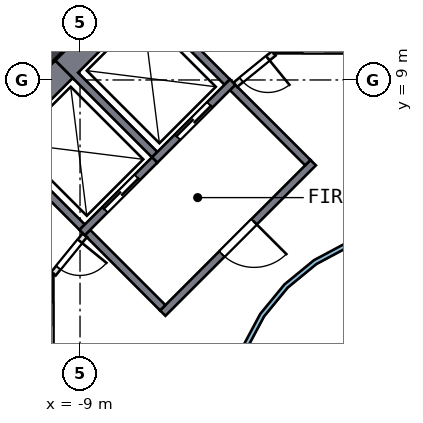
"""IFC4 building model, lengths in metres.
Left out: names, types, materials, properties, quantities, classifications, styles, units other than length and angle.
Written with IfcOpenShell. Run it as: python <this file> out.ifc"""

import sys

from ifc_helpers import new_model, si_unit, direction, frame, frame_2d, origin, place, context, subcontext, project, spatial, polyline, rectangle, outline, extrude, element, fill, save


model = new_model("IFC4")
c1 = context("Model", 3, precision=1e-05, world=origin(), true_north=direction((0.0, 1.0)))
c2 = subcontext(c1, "Body", "Model", "MODEL_VIEW")
j1 = project(units=[si_unit("LENGTHUNIT", "METRE"), si_unit("PLANEANGLEUNIT", "RADIAN")], contexts=[c1])
p1 = place(None, origin())
s1 = spatial("IfcSite", under=j1, at=p1, CompositionType="ELEMENT")
p2 = place(p1, origin())
s2 = spatial("IfcBuilding", under=s1, at=p2, CompositionType="ELEMENT")
p3 = place(p2, frame((0.0, 0.0, 295.0)))
s3 = spatial("IfcBuildingStorey", under=s2, at=p3, CompositionType="ELEMENT", Elevation=295.0)
p4 = place(p3, frame((-5.64, 13.841, 0.0), z_axis=(0.0, 0.0, 1.0), x_axis=(-0.707106781, -0.707106781, 0.0)))
e1 = element("IfcWall", 1, at=p4, inside=s3, PredefinedType="SHEAR", context=c2, shape_type="SweptSolid", body=[
    extrude(rectangle(XDim=11.598, YDim=0.45, at=frame_2d((5.799, 0.0))), origin(), (0.0, 0.0, 1.0), 4.5),
])
p5 = place(p3, frame((-1.2, 9.8, 0.0), z_axis=(0.0, 0.0, 1.0), x_axis=(-1.0, 0.0, 0.0)))
e2 = element("IfcWall", 2, at=p5, inside=s3, PredefinedType="SOLIDWALL", context=c2, shape_type="SweptSolid", body=[
    extrude(rectangle(XDim=2.7, YDim=0.2, at=frame_2d((1.35, 0.0))), origin(), (0.0, 0.0, 1.0), 4.19),
])
p6 = place(p5, frame((0.75, 0.0, 0.0)))
e3 = element("IfcOpeningElement", 3, at=p6, cuts=e2, PredefinedType="OPENING", context=c2, shape_type="SweptSolid", body=[
    extrude(rectangle(XDim=1.2, YDim=2.1, at=frame_2d((0.6, 1.05))), frame((0.0, 0.11, 0.0), z_axis=(0.0, -1.0, 0.0), x_axis=(1.0, 0.0, 0.0)), (0.0, 0.0, 1.0), 0.22),
])
p7 = place(p3, frame((-9.8, 1.2, 0.0), z_axis=(0.0, 0.0, 1.0), x_axis=(0.0, 1.0, 0.0)))
e4 = element("IfcWall", 4, at=p7, inside=s3, PredefinedType="SOLIDWALL", context=c2, shape_type="SweptSolid", body=[
    extrude(rectangle(XDim=2.7, YDim=0.2, at=frame_2d((1.35, 0.0))), origin(), (0.0, 0.0, 1.0), 4.19),
])
p8 = place(p7, frame((0.75, 0.0, 0.0)))
e5 = element("IfcOpeningElement", 5, at=p8, cuts=e4, PredefinedType="OPENING", context=c2, shape_type="SweptSolid", body=[
    extrude(rectangle(XDim=1.2, YDim=2.1, at=frame_2d((0.6, 1.05))), frame((0.0, 0.11, 0.0), z_axis=(0.0, -1.0, 0.0), x_axis=(1.0, 0.0, 0.0)), (0.0, 0.0, 1.0), 0.22),
])
p9 = place(p3, origin())
e6 = element("IfcWall", 6, at=p9, inside=s3, PredefinedType="SOLIDWALL", context=c2, shape_type="SweptSolid", body=[
    extrude(outline(polyline([(-9.652, 9.51), (-7.601, 11.561), (-5.056, 9.016), (-5.197, 8.874), (-7.283, 10.96), (-9.051, 9.192), (-6.965, 7.106), (-7.106, 6.965), (-9.652, 9.51)])), origin(), (0.0, 0.0, 1.0), 4.19),
])
p10 = place(p3, frame((-4.985, 8.945, 0.0), z_axis=(0.0, 0.0, 1.0), x_axis=(-0.707106781, -0.707106781, 0.0)))
e7 = element("IfcWall", 7, at=p10, inside=s3, PredefinedType="SOLIDWALL", context=c2, shape_type="SweptSolid", body=[
    extrude(rectangle(XDim=2.9, YDim=0.2, at=frame_2d((1.45, 0.0))), origin(), (0.0, 0.0, 1.0), 4.19),
])
p11 = place(p10, frame((0.85, 0.0, 0.0)))
e8 = element("IfcOpeningElement", 8, at=p11, cuts=e7, PredefinedType="OPENING", context=c2, shape_type="SweptSolid", body=[
    extrude(rectangle(XDim=1.2, YDim=2.1, at=frame_2d((0.6, 1.05))), frame((0.0, 0.11, 0.0), z_axis=(0.0, -1.0, 0.0), x_axis=(1.0, 0.0, 0.0)), (0.0, 0.0, 1.0), 0.22),
])
p12 = place(p3, origin())
e9 = element("IfcWall", 9, at=p12, inside=s3, PredefinedType="SOLIDWALL", context=c2, shape_type="SweptSolid", body=[
    extrude(outline(polyline([(-11.561, 7.601), (-9.652, 9.51), (-9.192, 9.051), (-10.96, 7.283), (-8.874, 5.197), (-9.016, 5.056), (-11.561, 7.601)])), origin(), (0.0, 0.0, 1.0), 4.19),
])
p13 = place(p3, frame((-7.036, 6.894, 0.0), z_axis=(0.0, 0.0, 1.0), x_axis=(-0.707106781, -0.707106781, 0.0)))
e10 = element("IfcWall", 10, at=p13, inside=s3, PredefinedType="SOLIDWALL", context=c2, shape_type="SweptSolid", body=[
    extrude(rectangle(XDim=2.7, YDim=0.2, at=frame_2d((1.35, 0.0))), origin(), (0.0, 0.0, 1.0), 4.19),
])
p14 = place(p13, frame((0.65, 0.0, 0.0)))
e11 = element("IfcOpeningElement", 11, at=p14, cuts=e10, PredefinedType="OPENING", context=c2, shape_type="SweptSolid", body=[
    extrude(rectangle(XDim=1.2, YDim=2.1, at=frame_2d((0.6, 1.05))), frame((0.0, 0.11, 0.0), z_axis=(0.0, -1.0, 0.0), x_axis=(1.0, 0.0, 0.0)), (0.0, 0.0, 1.0), 0.22),
])
p15 = place(p3, frame((-2.864, 6.823, 0.0), z_axis=(0.0, 0.0, 1.0), x_axis=(-0.707106781, -0.707106781, 0.0)))
e12 = element("IfcWall", 12, at=p15, inside=s3, PredefinedType="SOLIDWALL", context=c2, shape_type="SweptSolid", body=[
    extrude(rectangle(XDim=5.6, YDim=0.2, at=frame_2d((2.8, 0.0))), origin(), (0.0, 0.0, 1.0), 4.19),
])
p16 = place(p15, frame((2.2, 0.0, 0.0)))
e13 = element("IfcOpeningElement", 13, at=p16, cuts=e12, PredefinedType="OPENING", context=c2, shape_type="SweptSolid", body=[
    extrude(rectangle(XDim=1.2, YDim=2.1, at=frame_2d((0.6, 1.05))), frame((0.0, 0.11, 0.0), z_axis=(0.0, -1.0, 0.0), x_axis=(1.0, 0.0, 0.0)), (0.0, 0.0, 1.0), 0.22),
])
for number, where, z_axis, x_axis in (
    (14, (-3.005, 6.823, 0.0), (0.0, 0.0, 1.0), (-0.707, 0.707, 0.0)),
    (15, (-6.823, 3.005, 0.0), (0.0, 0.0, 1.0), (-0.707, 0.707, 0.0)),
):
    element("IfcWall", number, at=place(p3, frame(where, z_axis=z_axis, x_axis=x_axis)), inside=s3, PredefinedType="SOLIDWALL", context=c2, shape_type="SweptSolid", body=[
        extrude(rectangle(XDim=2.8, YDim=0.2, at=frame_2d((1.4, 0.0))), origin(), (0.0, 0.0, 1.0), 4.19),
    ])
p17 = place(p3, frame((-3.9, 9.7, 0.0), z_axis=(0.0, 0.0, 1.0), x_axis=(-0.775559878, -0.631274009, 0.0)))
e16 = element("IfcWall", 16, at=p17, inside=s3, PredefinedType="PARTITIONING", context=c2, shape_type="SweptSolid", body=[
    extrude(rectangle(XDim=1.308, YDim=0.15, at=frame_2d((0.654, 0.0))), origin(), (0.0, 0.0, 1.0), 4.19),
])
p18 = place(p17, frame((0.204, 0.0, 0.0)))
e17 = element("IfcOpeningElement", 17, at=p18, cuts=e16, PredefinedType="OPENING", context=c2, shape_type="SweptSolid", body=[
    extrude(rectangle(XDim=0.9, YDim=2.1, at=frame_2d((0.45, 1.05))), frame((0.0, 0.085, 0.0), z_axis=(0.0, -1.0, 0.0), x_axis=(1.0, 0.0, 0.0)), (0.0, 0.0, 1.0), 0.17),
])
p19 = place(p3, frame((-8.874, 4.914, 0.0), z_axis=(0.0, 0.0, 1.0), x_axis=(-0.631274009, -0.775559878, 0.0)))
e18 = element("IfcWall", 18, at=p19, inside=s3, PredefinedType="PARTITIONING", context=c2, shape_type="SweptSolid", body=[
    extrude(rectangle(XDim=1.308, YDim=0.15, at=frame_2d((0.654, 0.0))), origin(), (0.0, 0.0, 1.0), 4.19),
])
p20 = place(p19, frame((0.204, 0.0, 0.0)))
e19 = element("IfcOpeningElement", 19, at=p20, cuts=e18, PredefinedType="OPENING", context=c2, shape_type="SweptSolid", body=[
    extrude(rectangle(XDim=0.9, YDim=2.1, at=frame_2d((0.45, 1.05))), frame((0.0, 0.085, 0.0), z_axis=(0.0, -1.0, 0.0), x_axis=(1.0, 0.0, 0.0)), (0.0, 0.0, 1.0), 0.17),
])
p21 = place(p3, origin())
e20 = element("IfcWall", 20, at=p21, inside=s3, PredefinedType="SOLIDWALL", context=c2, shape_type="SweptSolid", body=[
    extrude(outline(polyline([(5.021, -0.999), (4.73, -1.959), (4.257, -2.844), (3.62, -3.62), (2.844, -4.257), (1.959, -4.73), (0.999, -5.021), (0.0, -5.12), (-0.999, -5.021), (-1.959, -4.73), (-2.844, -4.257), (-3.62, -3.62), (-4.257, -2.844), (-4.73, -1.959), (-5.021, -0.999), (-5.12, 0.0), (-5.021, 0.999), (-4.73, 1.959), (-4.257, 2.844), (-3.62, 3.62), (-2.844, 4.257), (-1.959, 4.73), (-0.999, 5.021), (0.0, 5.12), (0.999, 5.021), (1.959, 4.73), (2.844, 4.257), (3.62, 3.62), (4.257, 2.844), (4.73, 1.959), (5.021, 0.999), (5.12, 0.0), (5.021, -0.999)]), holes=[polyline([(4.904, 0.976), (4.619, 1.913), (4.157, 2.778), (3.535, 3.535), (2.778, 4.157), (1.913, 4.619), (0.976, 4.904), (0.0, 5.0), (-0.976, 4.904), (-1.913, 4.619), (-2.778, 4.157), (-3.535, 3.535), (-4.157, 2.778), (-4.619, 1.913), (-4.904, 0.976), (-5.0, 0.0), (-4.904, -0.976), (-4.619, -1.913), (-4.157, -2.778), (-3.535, -3.535), (-2.778, -4.157), (-1.913, -4.619), (-0.976, -4.904), (0.0, -5.0), (0.976, -4.904), (1.913, -4.619), (2.778, -4.157), (3.535, -3.535), (4.157, -2.778), (4.619, -1.913), (4.904, -0.976), (5.0, 0.0), (4.904, 0.976)])]), origin(), (0.0, 0.0, 1.0), 4.19),
])
p22 = place(p11, origin())
e21 = element("IfcDoor", 21, at=p22, inside=s3, OperationType="DOUBLE_DOOR_SLIDING", PredefinedType="DOOR", context=c2, shape_type="SweptSolid", body=[
    extrude(rectangle(XDim=1.2, YDim=2.1, at=frame_2d((0.6, 1.05))), frame((0.0, 0.025, 0.0), z_axis=(0.0, -1.0, 0.0), x_axis=(1.0, 0.0, 0.0)), (0.0, 0.0, 1.0), 0.05),
])
fill(e8, e21)
p23 = place(p14, origin())
e22 = element("IfcDoor", 22, at=p23, inside=s3, OperationType="DOUBLE_DOOR_SLIDING", PredefinedType="DOOR", context=c2, shape_type="SweptSolid", body=[
    extrude(rectangle(XDim=1.2, YDim=2.1, at=frame_2d((0.6, 1.05))), frame((0.0, 0.025, 0.0), z_axis=(0.0, -1.0, 0.0), x_axis=(1.0, 0.0, 0.0)), (0.0, 0.0, 1.0), 0.05),
])
fill(e11, e22)
p24 = place(p16, origin())
e23 = element("IfcDoor", 23, at=p24, inside=s3, OperationType="SINGLE_SWING_LEFT", PredefinedType="DOOR", context=c2, shape_type="SweptSolid", body=[
    extrude(rectangle(XDim=1.2, YDim=2.1, at=frame_2d((0.6, 1.05))), frame((0.0, 0.025, 0.0), z_axis=(0.0, -1.0, 0.0), x_axis=(1.0, 0.0, 0.0)), (0.0, 0.0, 1.0), 0.05),
])
fill(e13, e23)
p25 = place(p18, origin())
e24 = element("IfcDoor", 24, at=p25, inside=s3, OperationType="SINGLE_SWING_LEFT", PredefinedType="DOOR", context=c2, shape_type="SweptSolid", body=[
    extrude(rectangle(XDim=0.9, YDim=2.1, at=frame_2d((0.45, 1.05))), frame((0.0, 0.025, 0.0), z_axis=(0.0, -1.0, 0.0), x_axis=(1.0, 0.0, 0.0)), (0.0, 0.0, 1.0), 0.05),
])
fill(e17, e24)
p26 = place(p20, origin())
e25 = element("IfcDoor", 25, at=p26, inside=s3, OperationType="SINGLE_SWING_LEFT", PredefinedType="DOOR", context=c2, shape_type="SweptSolid", body=[
    extrude(rectangle(XDim=0.9, YDim=2.1, at=frame_2d((0.45, 1.05))), frame((0.0, 0.025, 0.0), z_axis=(0.0, -1.0, 0.0), x_axis=(1.0, 0.0, 0.0)), (0.0, 0.0, 1.0), 0.05),
])
fill(e19, e25)
save(model, sys.argv[1])
